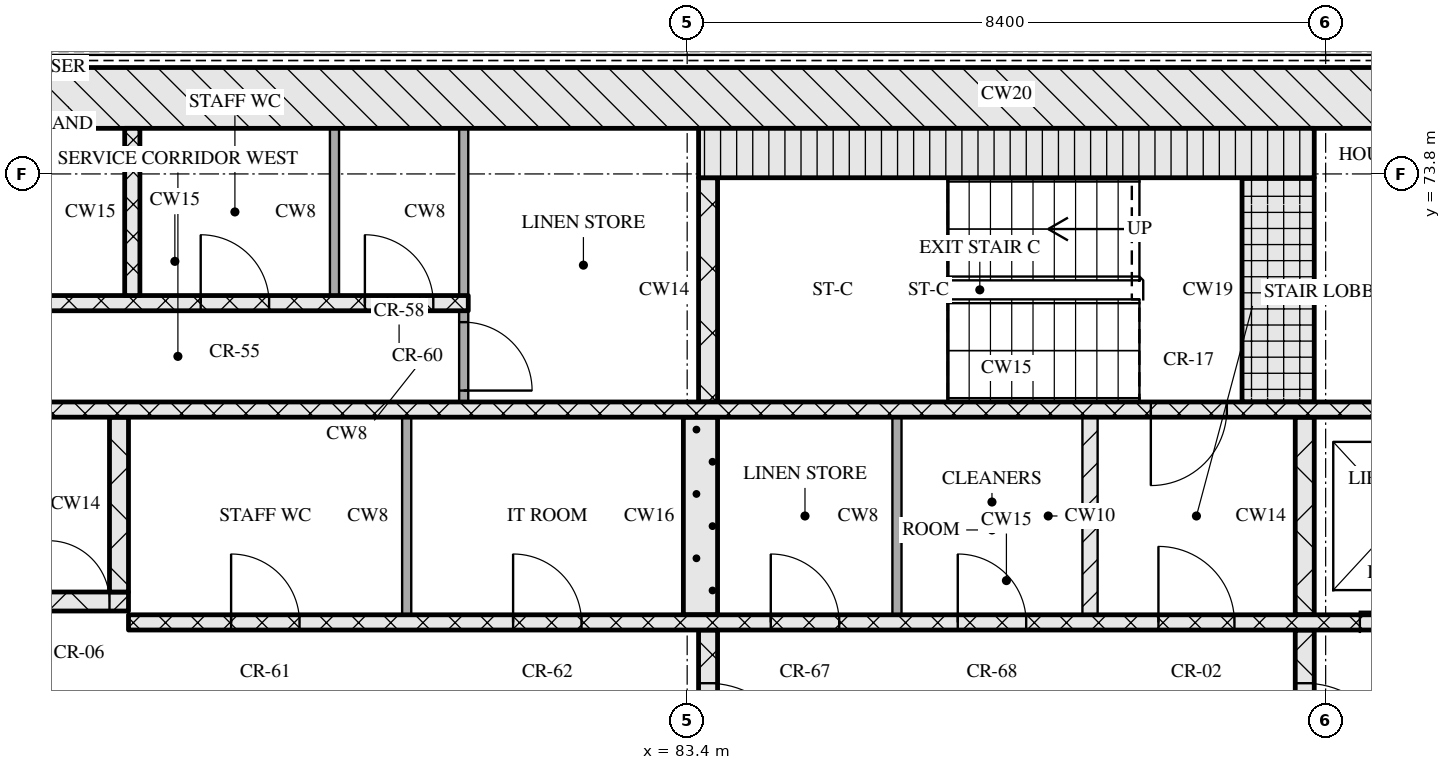
"""IFC4 building model, lengths in metres.
Left out: names, types, materials, properties, quantities, classifications, styles, units other than length and angle.
Written with IfcOpenShell. Run it as: python <this file> out.ifc"""

import sys

from ifc_helpers import new_model, si_unit, direction, frame, frame_2d, origin, place, context, subcontext, project, spatial, rectangle, extrude, element, fill, save


model = new_model("IFC4")
c1 = context("Model", 3, precision=1e-05, world=origin(), true_north=direction((0.0, 1.0)))
c2 = subcontext(c1, "Body", "Model", "MODEL_VIEW")
j1 = project(units=[si_unit("LENGTHUNIT", "METRE"), si_unit("PLANEANGLEUNIT", "RADIAN")], contexts=[c1])
p1 = place(None, origin())
s1 = spatial("IfcSite", under=j1, at=p1, CompositionType="ELEMENT")
p2 = place(p1, origin())
s2 = spatial("IfcBuilding", under=s1, at=p2, CompositionType="ELEMENT")
p3 = place(p2, frame((0.0, 0.0, 169.05)))
s3 = spatial("IfcBuildingStorey", under=s2, at=p3, CompositionType="ELEMENT", Elevation=169.05)
p4 = place(p3, frame((67.0, 74.8, 0.0), z_axis=(0.0, 0.0, 1.0), x_axis=(1.0, 0.0, 0.0)))
e1 = element("IfcWall", 1, at=p4, inside=s3, PredefinedType="SOLIDWALL", context=c2, shape_type="SweptSolid", body=[
    extrude(rectangle(XDim=41.2, YDim=0.8, at=frame_2d((20.6, 0.0))), origin(), (0.0, 0.0, 1.0), 3.32),
])
p5 = place(p3, frame((83.675, 65.2, 0.0), z_axis=(0.0, 0.0, 1.0), x_axis=(0.0, 1.0, 0.0)))
e2 = element("IfcWall", 2, at=p5, inside=s3, PredefinedType="SOLIDWALL", context=c2, shape_type="SweptSolid", body=[
    extrude(rectangle(XDim=2.6, YDim=0.25, at=frame_2d((1.3, 0.0))), origin(), (0.0, 0.0, 1.0), 3.32),
])
p6 = place(p5, frame((0.7, 0.0, 0.0)))
e3 = element("IfcOpeningElement", 3, at=p6, cuts=e2, PredefinedType="OPENING", context=c2, shape_type="SweptSolid", body=[
    extrude(rectangle(XDim=1.2, YDim=2.1, at=frame_2d((0.6, 1.05))), frame((0.0, 0.135, 0.0), z_axis=(0.0, -1.0, 0.0), x_axis=(1.0, 0.0, 0.0)), (0.0, 0.0, 1.0), 0.27),
])
p7 = place(p3, frame((91.525, 65.2, 0.0), z_axis=(0.0, 0.0, 1.0), x_axis=(0.0, 1.0, 0.0)))
e4 = element("IfcWall", 4, at=p7, inside=s3, PredefinedType="SOLIDWALL", context=c2, shape_type="SweptSolid", body=[
    extrude(rectangle(XDim=2.6, YDim=0.25, at=frame_2d((1.3, 0.0))), origin(), (0.0, 0.0, 1.0), 3.32),
])
p8 = place(p7, frame((0.7, 0.0, 0.0)))
e5 = element("IfcOpeningElement", 5, at=p8, cuts=e4, PredefinedType="OPENING", context=c2, shape_type="SweptSolid", body=[
    extrude(rectangle(XDim=1.2, YDim=2.1, at=frame_2d((0.6, 1.05))), frame((0.0, 0.135, 0.0), z_axis=(0.0, -1.0, 0.0), x_axis=(1.0, 0.0, 0.0)), (0.0, 0.0, 1.0), 0.27),
])
p9 = place(p3, frame((76.05, 67.9, 0.0), z_axis=(0.0, 0.0, 1.0), x_axis=(1.0, 0.0, 0.0)))
e6 = element("IfcWall", 6, at=p9, inside=s3, PredefinedType="SOLIDWALL", context=c2, shape_type="SweptSolid", body=[
    extrude(rectangle(XDim=23.1, YDim=0.2, at=frame_2d((11.55, 0.0))), origin(), (0.0, 0.0, 1.0), 3.32),
])
p10 = place(p9, frame((1.35, 0.0, 0.0)))
e7 = element("IfcOpeningElement", 7, at=p10, cuts=e6, PredefinedType="OPENING", context=c2, shape_type="SweptSolid", body=[
    extrude(rectangle(XDim=0.9, YDim=2.1, at=frame_2d((0.45, 1.05))), frame((0.0, 0.11, 0.0), z_axis=(0.0, -1.0, 0.0), x_axis=(1.0, 0.0, 0.0)), (0.0, 0.0, 1.0), 0.22),
])
p11 = place(p9, frame((5.06, 0.0, 0.0)))
e8 = element("IfcOpeningElement", 8, at=p11, cuts=e6, PredefinedType="OPENING", context=c2, shape_type="SweptSolid", body=[
    extrude(rectangle(XDim=0.9, YDim=2.1, at=frame_2d((0.45, 1.05))), frame((0.0, 0.11, 0.0), z_axis=(0.0, -1.0, 0.0), x_axis=(1.0, 0.0, 0.0)), (0.0, 0.0, 1.0), 0.22),
])
p12 = place(p9, frame((8.45, 0.0, 0.0)))
e9 = element("IfcOpeningElement", 9, at=p12, cuts=e6, PredefinedType="OPENING", context=c2, shape_type="SweptSolid", body=[
    extrude(rectangle(XDim=0.9, YDim=2.1, at=frame_2d((0.45, 1.05))), frame((0.0, 0.11, 0.0), z_axis=(0.0, -1.0, 0.0), x_axis=(1.0, 0.0, 0.0)), (0.0, 0.0, 1.0), 0.22),
])
p13 = place(p9, frame((10.91, 0.0, 0.0)))
e10 = element("IfcOpeningElement", 10, at=p13, cuts=e6, PredefinedType="OPENING", context=c2, shape_type="SweptSolid", body=[
    extrude(rectangle(XDim=0.9, YDim=2.1, at=frame_2d((0.45, 1.05))), frame((0.0, 0.11, 0.0), z_axis=(0.0, -1.0, 0.0), x_axis=(1.0, 0.0, 0.0)), (0.0, 0.0, 1.0), 0.22),
])
p14 = place(p9, frame((13.55, 0.0, 0.0)))
e11 = element("IfcOpeningElement", 11, at=p14, cuts=e6, PredefinedType="OPENING", context=c2, shape_type="SweptSolid", body=[
    extrude(rectangle(XDim=1.0, YDim=2.1, at=frame_2d((0.5, 1.05))), frame((0.0, 0.11, 0.0), z_axis=(0.0, -1.0, 0.0), x_axis=(1.0, 0.0, 0.0)), (0.0, 0.0, 1.0), 0.22),
])
p15 = place(p9, frame((16.2, 0.0, 0.0)))
e12 = element("IfcOpeningElement", 12, at=p15, cuts=e6, PredefinedType="OPENING", context=c2, shape_type="SweptSolid", body=[
    extrude(rectangle(XDim=1.1, YDim=2.1, at=frame_2d((0.55, 1.05))), frame((0.0, 0.11, 0.0), z_axis=(0.0, -1.0, 0.0), x_axis=(1.0, 0.0, 0.0)), (0.0, 0.0, 1.0), 0.22),
])
p16 = place(p9, frame((18.7, 0.0, 0.0)))
e13 = element("IfcOpeningElement", 13, at=p16, cuts=e6, PredefinedType="OPENING", context=c2, shape_type="SweptSolid", body=[
    extrude(rectangle(XDim=1.1, YDim=2.1, at=frame_2d((0.55, 1.05))), frame((0.0, 0.11, 0.0), z_axis=(0.0, -1.0, 0.0), x_axis=(1.0, 0.0, 0.0)), (0.0, 0.0, 1.0), 0.22),
])
p17 = place(p9, frame((21.2, 0.0, 0.0)))
e14 = element("IfcOpeningElement", 14, at=p17, cuts=e6, PredefinedType="OPENING", context=c2, shape_type="SweptSolid", body=[
    extrude(rectangle(XDim=1.1, YDim=2.1, at=frame_2d((0.55, 1.05))), frame((0.0, 0.11, 0.0), z_axis=(0.0, -1.0, 0.0), x_axis=(1.0, 0.0, 0.0)), (0.0, 0.0, 1.0), 0.22),
])
p18 = place(p3, frame((79.71, 68.0, 0.0), z_axis=(0.0, 0.0, 1.0), x_axis=(0.0, 1.0, 0.0)))
e15 = element("IfcWall", 15, at=p18, inside=s3, PredefinedType="PARTITIONING", context=c2, shape_type="SweptSolid", body=[
    extrude(rectangle(XDim=2.6, YDim=0.12, at=frame_2d((1.3, 0.0))), origin(), (0.0, 0.0, 1.0), 3.32),
])
p19 = place(p3, frame((83.575, 68.0, 0.0), z_axis=(0.0, 0.0, 1.0), x_axis=(0.0, 1.0, 0.0)))
e16 = element("IfcWall", 16, at=p19, inside=s3, PredefinedType="SOLIDWALL", context=c2, shape_type="SweptSolid", body=[
    extrude(rectangle(XDim=2.6, YDim=0.45, at=frame_2d((1.3, 0.0))), origin(), (0.0, 0.0, 1.0), 3.32),
])
p20 = place(p3, frame((86.16, 68.0, 0.0), z_axis=(0.0, 0.0, 1.0), x_axis=(0.0, 1.0, 0.0)))
e17 = element("IfcWall", 17, at=p20, inside=s3, PredefinedType="PARTITIONING", context=c2, shape_type="SweptSolid", body=[
    extrude(rectangle(XDim=2.6, YDim=0.12, at=frame_2d((1.3, 0.0))), origin(), (0.0, 0.0, 1.0), 3.32),
])
p21 = place(p3, frame((88.7, 68.0, 0.0), z_axis=(0.0, 0.0, 1.0), x_axis=(0.0, 1.0, 0.0)))
e18 = element("IfcWall", 18, at=p21, inside=s3, PredefinedType="PARTITIONING", context=c2, shape_type="SweptSolid", body=[
    extrude(rectangle(XDim=2.6, YDim=0.2, at=frame_2d((1.3, 0.0))), origin(), (0.0, 0.0, 1.0), 3.32),
])
p22 = place(p3, frame((91.525, 68.0, 0.0), z_axis=(0.0, 0.0, 1.0), x_axis=(0.0, 1.0, 0.0)))
e19 = element("IfcWall", 19, at=p22, inside=s3, PredefinedType="SOLIDWALL", context=c2, shape_type="SweptSolid", body=[
    extrude(rectangle(XDim=2.6, YDim=0.25, at=frame_2d((1.3, 0.0))), origin(), (0.0, 0.0, 1.0), 3.32),
])
p23 = place(p3, frame((67.8, 68.175, 0.0), z_axis=(0.0, 0.0, 1.0), x_axis=(1.0, 0.0, 0.0)))
e20 = element("IfcWall", 20, at=p23, inside=s3, PredefinedType="SOLIDWALL", context=c2, shape_type="SweptSolid", body=[
    extrude(rectangle(XDim=8.25, YDim=0.25, at=frame_2d((4.125, 0.0))), origin(), (0.0, 0.0, 1.0), 3.32),
])
p24 = place(p23, frame((5.7, 0.0, 0.0)))
e21 = element("IfcOpeningElement", 21, at=p24, cuts=e20, PredefinedType="OPENING", context=c2, shape_type="SweptSolid", body=[
    extrude(rectangle(XDim=1.0, YDim=2.1, at=frame_2d((0.5, 1.05))), frame((0.0, 0.135, 0.0), z_axis=(0.0, -1.0, 0.0), x_axis=(1.0, 0.0, 0.0)), (0.0, 0.0, 1.0), 0.27),
])
p25 = place(p23, frame((7.2, 0.0, 0.0)))
e22 = element("IfcOpeningElement", 22, at=p25, cuts=e20, PredefinedType="OPENING", context=c2, shape_type="SweptSolid", body=[
    extrude(rectangle(XDim=0.8, YDim=2.1, at=frame_2d((0.4, 1.05))), frame((0.0, 0.135, 0.0), z_axis=(0.0, -1.0, 0.0), x_axis=(1.0, 0.0, 0.0)), (0.0, 0.0, 1.0), 0.27),
])
p26 = place(p3, frame((75.925, 68.3, 0.0), z_axis=(0.0, 0.0, 1.0), x_axis=(0.0, 1.0, 0.0)))
e23 = element("IfcWall", 23, at=p26, inside=s3, PredefinedType="SOLIDWALL", context=c2, shape_type="SweptSolid", body=[
    extrude(rectangle(XDim=2.3, YDim=0.25, at=frame_2d((1.15, 0.0))), origin(), (0.0, 0.0, 1.0), 3.32),
])
p27 = place(p3, frame((67.8, 70.7, 0.0), z_axis=(0.0, 0.0, 1.0), x_axis=(1.0, 0.0, 0.0)))
e24 = element("IfcWall", 24, at=p27, inside=s3, PredefinedType="SOLIDWALL", context=c2, shape_type="SweptSolid", body=[
    extrude(rectangle(XDim=39.6, YDim=0.2, at=frame_2d((19.8, 0.0))), origin(), (0.0, 0.0, 1.0), 3.32),
])
p28 = place(p27, frame((0.65, 0.0, 0.0)))
e25 = element("IfcOpeningElement", 25, at=p28, cuts=e24, PredefinedType="OPENING", context=c2, shape_type="SweptSolid", body=[
    extrude(rectangle(XDim=1.1, YDim=2.1, at=frame_2d((0.55, 1.05))), frame((0.0, 0.11, 0.0), z_axis=(0.0, -1.0, 0.0), x_axis=(1.0, 0.0, 0.0)), (0.0, 0.0, 1.0), 0.22),
])
p29 = place(p27, frame((3.25, 0.0, 0.0)))
e26 = element("IfcOpeningElement", 26, at=p29, cuts=e24, PredefinedType="OPENING", context=c2, shape_type="SweptSolid", body=[
    extrude(rectangle(XDim=1.1, YDim=2.1, at=frame_2d((0.55, 1.05))), frame((0.0, 0.11, 0.0), z_axis=(0.0, -1.0, 0.0), x_axis=(1.0, 0.0, 0.0)), (0.0, 0.0, 1.0), 0.22),
])
p30 = place(p27, frame((5.9, 0.0, 0.0)))
e27 = element("IfcOpeningElement", 27, at=p30, cuts=e24, PredefinedType="OPENING", context=c2, shape_type="SweptSolid", body=[
    extrude(rectangle(XDim=1.0, YDim=2.1, at=frame_2d((0.5, 1.05))), frame((0.0, 0.11, 0.0), z_axis=(0.0, -1.0, 0.0), x_axis=(1.0, 0.0, 0.0)), (0.0, 0.0, 1.0), 0.22),
])
p31 = place(p27, frame((21.7, 0.0, 0.0)))
e28 = element("IfcOpeningElement", 28, at=p31, cuts=e24, PredefinedType="OPENING", context=c2, shape_type="SweptSolid", body=[
    extrude(rectangle(XDim=1.0, YDim=2.1, at=frame_2d((0.5, 1.05))), frame((0.0, 0.11, 0.0), z_axis=(0.0, -1.0, 0.0), x_axis=(1.0, 0.0, 0.0)), (0.0, 0.0, 1.0), 0.22),
])
p32 = place(p27, frame((32.7, 0.0, 0.0)))
e29 = element("IfcOpeningElement", 29, at=p32, cuts=e24, PredefinedType="OPENING", context=c2, shape_type="SweptSolid", body=[
    extrude(rectangle(XDim=1.0, YDim=2.1, at=frame_2d((0.5, 1.05))), frame((0.0, 0.11, 0.0), z_axis=(0.0, -1.0, 0.0), x_axis=(1.0, 0.0, 0.0)), (0.0, 0.0, 1.0), 0.22),
])
p33 = place(p27, frame((35.25, 0.0, 0.0)))
e30 = element("IfcOpeningElement", 30, at=p33, cuts=e24, PredefinedType="OPENING", context=c2, shape_type="SweptSolid", body=[
    extrude(rectangle(XDim=1.1, YDim=2.1, at=frame_2d((0.55, 1.05))), frame((0.0, 0.11, 0.0), z_axis=(0.0, -1.0, 0.0), x_axis=(1.0, 0.0, 0.0)), (0.0, 0.0, 1.0), 0.22),
])
p34 = place(p27, frame((37.85, 0.0, 0.0)))
e31 = element("IfcOpeningElement", 31, at=p34, cuts=e24, PredefinedType="OPENING", context=c2, shape_type="SweptSolid", body=[
    extrude(rectangle(XDim=1.1, YDim=2.1, at=frame_2d((0.55, 1.05))), frame((0.0, 0.11, 0.0), z_axis=(0.0, -1.0, 0.0), x_axis=(1.0, 0.0, 0.0)), (0.0, 0.0, 1.0), 0.22),
])
p35 = place(p3, frame((80.46, 70.8, 0.0), z_axis=(0.0, 0.0, 1.0), x_axis=(0.0, 1.0, 0.0)))
e32 = element("IfcWall", 32, at=p35, inside=s3, PredefinedType="PARTITIONING", context=c2, shape_type="SweptSolid", body=[
    extrude(rectangle(XDim=1.2, YDim=0.12, at=frame_2d((0.6, 0.0))), origin(), (0.0, 0.0, 1.0), 3.32),
])
p36 = place(p35, frame((0.15, 0.0, 0.0)))
e33 = element("IfcOpeningElement", 33, at=p36, cuts=e32, PredefinedType="OPENING", context=c2, shape_type="SweptSolid", body=[
    extrude(rectangle(XDim=0.9, YDim=2.1, at=frame_2d((0.45, 1.05))), frame((0.0, 0.07, 0.0), z_axis=(0.0, -1.0, 0.0), x_axis=(1.0, 0.0, 0.0)), (0.0, 0.0, 1.0), 0.14),
])
p37 = place(p3, frame((83.675, 70.8, 0.0), z_axis=(0.0, 0.0, 1.0), x_axis=(0.0, 1.0, 0.0)))
e34 = element("IfcWall", 34, at=p37, inside=s3, PredefinedType="SOLIDWALL", context=c2, shape_type="SweptSolid", body=[
    extrude(rectangle(XDim=2.95, YDim=0.25, at=frame_2d((1.475, 0.0))), origin(), (0.0, 0.0, 1.0), 3.32),
])
p38 = place(p3, frame((91.175, 70.8, 0.0), z_axis=(0.0, 0.0, 1.0), x_axis=(0.0, 1.0, 0.0)))
e35 = element("IfcWall", 35, at=p38, inside=s3, PredefinedType="SOLIDWALL", context=c2, shape_type="SweptSolid", body=[
    extrude(rectangle(XDim=2.95, YDim=0.95, at=frame_2d((1.475, 0.0))), origin(), (0.0, 0.0, 1.0), 3.32),
])
p39 = place(p3, frame((72.8, 72.1, 0.0), z_axis=(0.0, 0.0, 1.0), x_axis=(1.0, 0.0, 0.0)))
e36 = element("IfcWall", 36, at=p39, inside=s3, PredefinedType="SOLIDWALL", context=c2, shape_type="SweptSolid", body=[
    extrude(rectangle(XDim=7.72, YDim=0.2, at=frame_2d((3.86, 0.0))), origin(), (0.0, 0.0, 1.0), 3.32),
])
p40 = place(p39, frame((1.25, 0.0, 0.0)))
e37 = element("IfcOpeningElement", 37, at=p40, cuts=e36, PredefinedType="OPENING", context=c2, shape_type="SweptSolid", body=[
    extrude(rectangle(XDim=0.9, YDim=2.1, at=frame_2d((0.45, 1.05))), frame((0.0, 0.11, 0.0), z_axis=(0.0, -1.0, 0.0), x_axis=(1.0, 0.0, 0.0)), (0.0, 0.0, 1.0), 0.22),
])
p41 = place(p39, frame((4.2, 0.0, 0.0)))
e38 = element("IfcOpeningElement", 38, at=p41, cuts=e36, PredefinedType="OPENING", context=c2, shape_type="SweptSolid", body=[
    extrude(rectangle(XDim=0.9, YDim=2.1, at=frame_2d((0.45, 1.05))), frame((0.0, 0.11, 0.0), z_axis=(0.0, -1.0, 0.0), x_axis=(1.0, 0.0, 0.0)), (0.0, 0.0, 1.0), 0.22),
])
p42 = place(p39, frame((6.36, 0.0, 0.0)))
e39 = element("IfcOpeningElement", 39, at=p42, cuts=e36, PredefinedType="OPENING", context=c2, shape_type="SweptSolid", body=[
    extrude(rectangle(XDim=0.9, YDim=2.1, at=frame_2d((0.45, 1.05))), frame((0.0, 0.11, 0.0), z_axis=(0.0, -1.0, 0.0), x_axis=(1.0, 0.0, 0.0)), (0.0, 0.0, 1.0), 0.22),
])
p43 = place(p3, frame((76.1, 72.2, 0.0), z_axis=(0.0, 0.0, 1.0), x_axis=(0.0, 1.0, 0.0)))
e40 = element("IfcWall", 40, at=p43, inside=s3, PredefinedType="SOLIDWALL", context=c2, shape_type="SweptSolid", body=[
    extrude(rectangle(XDim=2.2, YDim=0.2, at=frame_2d((1.1, 0.0))), origin(), (0.0, 0.0, 1.0), 3.32),
])
for number, where, z_axis, x_axis in (
    (41, (78.76, 72.2, 0.0), (0.0, 0.0, 1.0), (0.0, 1.0, 0.0)),
    (42, (80.46, 72.2, 0.0), (0.0, 0.0, 1.0), (0.0, 1.0, 0.0)),
):
    element("IfcWall", number, at=place(p3, frame(where, z_axis=z_axis, x_axis=x_axis)), inside=s3, PredefinedType="PARTITIONING", context=c2, shape_type="SweptSolid", body=[
        extrude(rectangle(XDim=2.2, YDim=0.12, at=frame_2d((1.1, 0.0))), origin(), (0.0, 0.0, 1.0), 3.32),
    ])
p44 = place(p3, frame((83.55, 74.075, 0.0), z_axis=(0.0, 0.0, 1.0), x_axis=(1.0, 0.0, 0.0)))
e43 = element("IfcWall", 43, at=p44, inside=s3, PredefinedType="SOLIDWALL", context=c2, shape_type="SweptSolid", body=[
    extrude(rectangle(XDim=8.1, YDim=0.65, at=frame_2d((4.05, 0.0))), origin(), (0.0, 0.0, 1.0), 3.32),
])
p45 = place(p6, origin())
e44 = element("IfcDoor", 44, at=p45, inside=s3, OperationType="SINGLE_SWING_RIGHT", PredefinedType="DOOR", context=c2, shape_type="SweptSolid", body=[
    extrude(rectangle(XDim=1.2, YDim=2.1, at=frame_2d((0.6, 1.05))), frame((0.0, 0.025, 0.0), z_axis=(0.0, -1.0, 0.0), x_axis=(1.0, 0.0, 0.0)), (0.0, 0.0, 1.0), 0.05),
])
fill(e3, e44)
p46 = place(p8, origin())
e45 = element("IfcDoor", 45, at=p46, inside=s3, OperationType="SINGLE_SWING_RIGHT", PredefinedType="DOOR", context=c2, shape_type="SweptSolid", body=[
    extrude(rectangle(XDim=1.2, YDim=2.1, at=frame_2d((0.6, 1.05))), frame((0.0, 0.025, 0.0), z_axis=(0.0, -1.0, 0.0), x_axis=(1.0, 0.0, 0.0)), (0.0, 0.0, 1.0), 0.05),
])
fill(e5, e45)
p47 = place(p10, origin())
e46 = element("IfcDoor", 46, at=p47, inside=s3, OperationType="SINGLE_SWING_LEFT", PredefinedType="DOOR", context=c2, shape_type="SweptSolid", body=[
    extrude(rectangle(XDim=0.9, YDim=2.1, at=frame_2d((0.45, 1.05))), frame((0.0, 0.025, 0.0), z_axis=(0.0, -1.0, 0.0), x_axis=(1.0, 0.0, 0.0)), (0.0, 0.0, 1.0), 0.05),
])
fill(e7, e46)
p48 = place(p11, origin())
e47 = element("IfcDoor", 47, at=p48, inside=s3, OperationType="SINGLE_SWING_LEFT", PredefinedType="DOOR", context=c2, shape_type="SweptSolid", body=[
    extrude(rectangle(XDim=0.9, YDim=2.1, at=frame_2d((0.45, 1.05))), frame((0.0, 0.025, 0.0), z_axis=(0.0, -1.0, 0.0), x_axis=(1.0, 0.0, 0.0)), (0.0, 0.0, 1.0), 0.05),
])
fill(e8, e47)
p49 = place(p12, origin())
e48 = element("IfcDoor", 48, at=p49, inside=s3, OperationType="SINGLE_SWING_LEFT", PredefinedType="DOOR", context=c2, shape_type="SweptSolid", body=[
    extrude(rectangle(XDim=0.9, YDim=2.1, at=frame_2d((0.45, 1.05))), frame((0.0, 0.025, 0.0), z_axis=(0.0, -1.0, 0.0), x_axis=(1.0, 0.0, 0.0)), (0.0, 0.0, 1.0), 0.05),
])
fill(e9, e48)
p50 = place(p13, origin())
e49 = element("IfcDoor", 49, at=p50, inside=s3, OperationType="SINGLE_SWING_LEFT", PredefinedType="DOOR", context=c2, shape_type="SweptSolid", body=[
    extrude(rectangle(XDim=0.9, YDim=2.1, at=frame_2d((0.45, 1.05))), frame((0.0, 0.025, 0.0), z_axis=(0.0, -1.0, 0.0), x_axis=(1.0, 0.0, 0.0)), (0.0, 0.0, 1.0), 0.05),
])
fill(e10, e49)
p51 = place(p14, origin())
e50 = element("IfcDoor", 50, at=p51, inside=s3, OperationType="SINGLE_SWING_LEFT", PredefinedType="DOOR", context=c2, shape_type="SweptSolid", body=[
    extrude(rectangle(XDim=1.0, YDim=2.1, at=frame_2d((0.5, 1.05))), frame((0.0, 0.025, 0.0), z_axis=(0.0, -1.0, 0.0), x_axis=(1.0, 0.0, 0.0)), (0.0, 0.0, 1.0), 0.05),
])
fill(e11, e50)
p52 = place(p15, origin())
e51 = element("IfcDoor", 51, at=p52, inside=s3, OperationType="SLIDING_TO_RIGHT", PredefinedType="DOOR", context=c2, shape_type="SweptSolid", body=[
    extrude(rectangle(XDim=1.1, YDim=2.1, at=frame_2d((0.55, 1.05))), frame((0.0, 0.025, 0.0), z_axis=(0.0, -1.0, 0.0), x_axis=(1.0, 0.0, 0.0)), (0.0, 0.0, 1.0), 0.05),
])
fill(e12, e51)
p53 = place(p25, origin())
e52 = element("IfcDoor", 52, at=p53, inside=s3, OperationType="SINGLE_SWING_LEFT", PredefinedType="DOOR", context=c2, shape_type="SweptSolid", body=[
    extrude(rectangle(XDim=0.8, YDim=2.1, at=frame_2d((0.4, 1.05))), frame((0.0, 0.025, 0.0), z_axis=(0.0, -1.0, 0.0), x_axis=(1.0, 0.0, 0.0)), (0.0, 0.0, 1.0), 0.05),
])
fill(e22, e52)
p54 = place(p31, origin())
e53 = element("IfcDoor", 53, at=p54, inside=s3, OperationType="SINGLE_SWING_RIGHT", PredefinedType="DOOR", context=c2, shape_type="SweptSolid", body=[
    extrude(rectangle(XDim=1.0, YDim=2.1, at=frame_2d((0.5, 1.05))), frame((0.0, 0.025, 0.0), z_axis=(0.0, -1.0, 0.0), x_axis=(1.0, 0.0, 0.0)), (0.0, 0.0, 1.0), 0.05),
])
fill(e28, e53)
p55 = place(p36, origin())
e54 = element("IfcDoor", 54, at=p55, inside=s3, OperationType="SINGLE_SWING_RIGHT", PredefinedType="DOOR", context=c2, shape_type="SweptSolid", body=[
    extrude(rectangle(XDim=0.9, YDim=2.1, at=frame_2d((0.45, 1.05))), frame((0.0, 0.025, 0.0), z_axis=(0.0, -1.0, 0.0), x_axis=(1.0, 0.0, 0.0)), (0.0, 0.0, 1.0), 0.05),
])
fill(e33, e54)
p56 = place(p41, origin())
e55 = element("IfcDoor", 55, at=p56, inside=s3, OperationType="SINGLE_SWING_LEFT", PredefinedType="DOOR", context=c2, shape_type="SweptSolid", body=[
    extrude(rectangle(XDim=0.9, YDim=2.1, at=frame_2d((0.45, 1.05))), frame((0.0, 0.025, 0.0), z_axis=(0.0, -1.0, 0.0), x_axis=(1.0, 0.0, 0.0)), (0.0, 0.0, 1.0), 0.05),
])
fill(e38, e55)
p57 = place(p42, origin())
e56 = element("IfcDoor", 56, at=p57, inside=s3, OperationType="SINGLE_SWING_LEFT", PredefinedType="DOOR", context=c2, shape_type="SweptSolid", body=[
    extrude(rectangle(XDim=0.9, YDim=2.1, at=frame_2d((0.45, 1.05))), frame((0.0, 0.025, 0.0), z_axis=(0.0, -1.0, 0.0), x_axis=(1.0, 0.0, 0.0)), (0.0, 0.0, 1.0), 0.05),
])
fill(e39, e56)
save(model, sys.argv[1])
